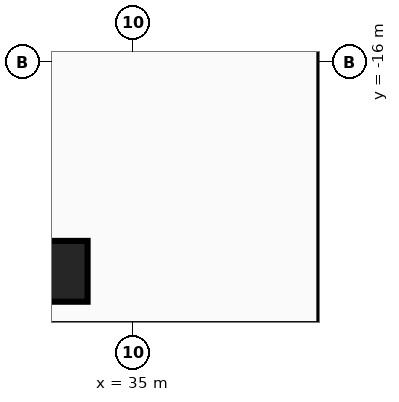
"""IFC4 building model, lengths in metres.
Left out: names, types, materials, properties, quantities, classifications, styles, units other than length and angle.
Written with IfcOpenShell. Run it as: python <this file> out.ifc"""

import sys

from ifc_helpers import new_model, si_unit, direction, frame, origin, origin_2d, place, context, subcontext, project, spatial, rectangle, extrude, source, transform, mapped, element, save


model = new_model("IFC4")
c1 = context("Model", 3, precision=1e-05, world=origin(), true_north=direction((0.0, 1.0)))
c2 = subcontext(c1, "Body", "Model", "MODEL_VIEW")
j1 = project(units=[si_unit("LENGTHUNIT", "METRE"), si_unit("PLANEANGLEUNIT", "RADIAN")], contexts=[c1])
p1 = place(None, origin())
s1 = spatial("IfcSite", under=j1, at=p1, CompositionType="ELEMENT")
p2 = place(p1, origin())
s2 = spatial("IfcBuilding", under=s1, at=p2, CompositionType="ELEMENT")
p3 = place(p2, frame((0.0, 0.0, -4.8)))
s3 = spatial("IfcBuildingStorey", under=s2, at=p3, CompositionType="ELEMENT", Elevation=-4.8)
m1 = source(origin(), c2, "Body", "SweptSolid", [
    extrude(rectangle(XDim=1.6, YDim=1.6, at=origin_2d()), origin(), (0.0, 0.0, 1.0), 4.8),
])
p4 = place(p3, frame((33.0, -21.5, 0.0), z_axis=(0.0, 0.0, 1.0), x_axis=(1.0, 0.0, 0.0)))
e1 = element("IfcColumn", 1, at=p4, inside=s3, PredefinedType="COLUMN", context=c2, shape_type="MappedRepresentation", body=[
    mapped(m1, transform((0.0, 0.0, 0.0), x_axis=(1.0, 0.0, 0.0), y_axis=(0.0, 1.0, 0.0), z_axis=(0.0, 0.0, 1.0), scale=1.0)),
])
save(model, sys.argv[1])
